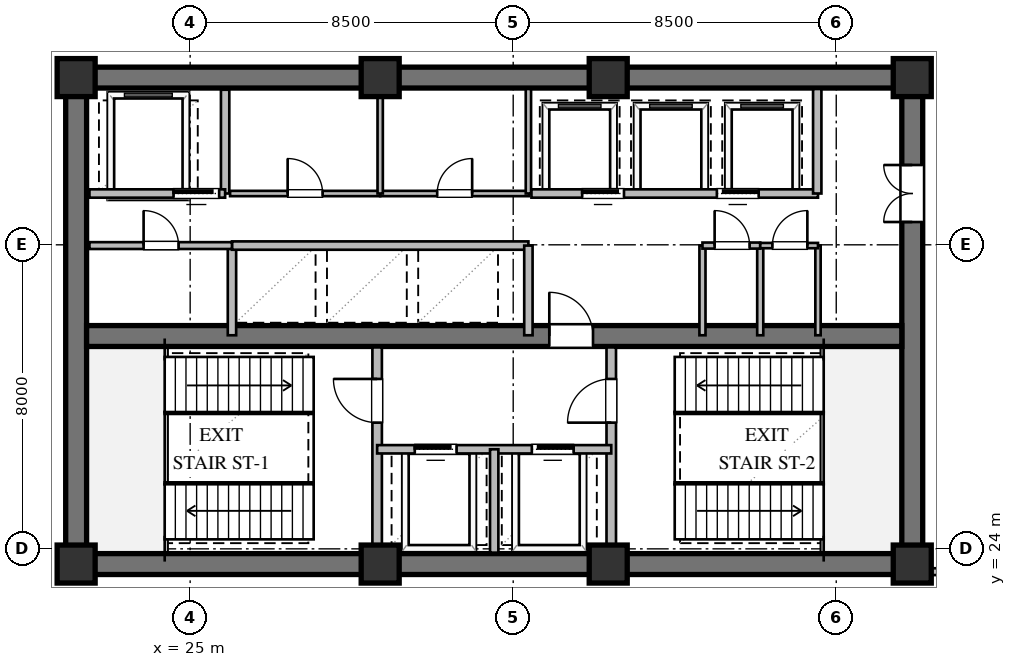
"""IFC4 building model, lengths in metres.
Left out: names, types, materials, properties, quantities, classifications, styles, units other than length and angle.
Written with IfcOpenShell. Run it as: python <this file> out.ifc"""

import sys

from ifc_helpers import new_model, si_unit, direction, frame, frame_2d, origin, origin_2d, place, context, subcontext, project, spatial, rectangle, extrude, element, fill, save


model = new_model("IFC4")
c1 = context("Model", 3, precision=1e-05, world=origin(), true_north=direction((0.0, 1.0)))
c2 = subcontext(c1, "Body", "Model", "MODEL_VIEW")
j1 = project(units=[si_unit("LENGTHUNIT", "METRE"), si_unit("PLANEANGLEUNIT", "RADIAN")], contexts=[c1])
p1 = place(None, origin())
s1 = spatial("IfcSite", under=j1, at=p1, CompositionType="ELEMENT")
p2 = place(p1, origin())
s2 = spatial("IfcBuilding", under=s1, at=p2, CompositionType="ELEMENT")
p3 = place(p2, frame((0.0, 0.0, 181.8)))
s3 = spatial("IfcBuildingStorey", under=s2, at=p3, CompositionType="ELEMENT", Elevation=181.8)
for number, where, z_axis, x_axis in (
    (1, (21.725, 23.6, 0.0), (0.0, 0.0, 1.0), (1.0, 0.0, 0.0)),
    (2, (21.725, 36.4, 0.0), (0.0, 0.0, 1.0), (1.0, 0.0, 0.0)),
):
    element("IfcWall", number, at=place(p3, frame(where, z_axis=z_axis, x_axis=x_axis)), inside=s3, PredefinedType="SHEAR", context=c2, shape_type="SweptSolid", body=[
        extrude(rectangle(XDim=22.55, YDim=0.55, at=frame_2d((11.275, 0.0))), origin(), (0.0, 0.0, 1.0), 5.16),
    ])
p4 = place(p3, frame((22.0, 23.875, 0.0), z_axis=(0.0, 0.0, 1.0), x_axis=(0.0, 1.0, 0.0)))
e3 = element("IfcWall", 3, at=p4, inside=s3, PredefinedType="SHEAR", context=c2, shape_type="SweptSolid", body=[
    extrude(rectangle(XDim=12.25, YDim=0.55, at=frame_2d((6.125, 0.0))), origin(), (0.0, 0.0, 1.0), 5.16),
])
p5 = place(p3, frame((44.0, 23.875, 0.0), z_axis=(0.0, 0.0, 1.0), x_axis=(0.0, 1.0, 0.0)))
e4 = element("IfcWall", 4, at=p5, inside=s3, PredefinedType="SHEAR", context=c2, shape_type="SweptSolid", body=[
    extrude(rectangle(XDim=12.25, YDim=0.55, at=frame_2d((6.125, 0.0))), origin(), (0.0, 0.0, 1.0), 5.16),
])
p6 = place(p5, frame((8.725, 0.0, 0.0)))
e5 = element("IfcOpeningElement", 5, at=p6, cuts=e4, PredefinedType="OPENING", context=c2, shape_type="SweptSolid", body=[
    extrude(rectangle(XDim=1.5, YDim=2.15, at=frame_2d((0.75, 1.075))), frame((0.0, 0.285, 0.0), z_axis=(0.0, -1.0, 0.0), x_axis=(1.0, 0.0, 0.0)), (0.0, 0.0, 1.0), 0.57),
])
p7 = place(p3, frame((22.275, 29.6, 0.0), z_axis=(0.0, 0.0, 1.0), x_axis=(1.0, 0.0, 0.0)))
e6 = element("IfcWall", 6, at=p7, inside=s3, PredefinedType="SHEAR", context=c2, shape_type="SweptSolid", body=[
    extrude(rectangle(XDim=21.45, YDim=0.55, at=frame_2d((10.725, 0.0))), origin(), (0.0, 0.0, 1.0), 5.16),
])
p8 = place(p7, frame((12.175, 0.0, 0.0)))
e7 = element("IfcOpeningElement", 7, at=p8, cuts=e6, PredefinedType="OPENING", context=c2, shape_type="SweptSolid", body=[
    extrude(rectangle(XDim=1.15, YDim=2.1, at=frame_2d((0.575, 1.05))), frame((0.0, 0.285, 0.0), z_axis=(0.0, -1.0, 0.0), x_axis=(1.0, 0.0, 0.0)), (0.0, 0.0, 1.0), 0.57),
])
for number, where, z_axis, x_axis in (
    (8, (22.0, 23.6, 0.0), (0.0, 0.0, 1.0), (1.0, 0.0, 0.0)),
    (9, (30.0, 23.6, 0.0), (0.0, 0.0, 1.0), (1.0, 0.0, 0.0)),
    (10, (36.0, 23.6, 0.0), (0.0, 0.0, 1.0), (1.0, 0.0, 0.0)),
    (11, (44.0, 23.6, 0.0), (0.0, 0.0, 1.0), (1.0, 0.0, 0.0)),
    (12, (44.0, 36.4, 0.0), (0.0, 0.0, 1.0), (1.0, 0.0, 0.0)),
    (13, (36.0, 36.4, 0.0), (0.0, 0.0, 1.0), (1.0, 0.0, 0.0)),
    (14, (30.0, 36.4, 0.0), (0.0, 0.0, 1.0), (1.0, 0.0, 0.0)),
    (15, (22.0, 36.4, 0.0), (0.0, 0.0, 1.0), (1.0, 0.0, 0.0)),
):
    element("IfcColumn", number, at=place(p3, frame(where, z_axis=z_axis, x_axis=x_axis)), inside=s3, PredefinedType="COLUMN", context=c2, shape_type="SweptSolid", body=[
        extrude(rectangle(XDim=1.0, YDim=1.0, at=origin_2d()), origin(), (0.0, 0.0, 1.0), 5.4),
    ])
p9 = place(p3, frame((29.92, 23.9, 0.0), z_axis=(0.0, 0.0, 1.0), x_axis=(0.0, 1.0, 0.0)))
e16 = element("IfcWall", 16, at=p9, inside=s3, PredefinedType="SOLIDWALL", context=c2, shape_type="SweptSolid", body=[
    extrude(rectangle(XDim=5.4, YDim=0.25, at=frame_2d((2.7, 0.0))), origin(), (0.0, 0.0, 1.0), 3.65),
])
p10 = place(p9, frame((3.421, 0.0, 0.0)))
e17 = element("IfcOpeningElement", 17, at=p10, cuts=e16, PredefinedType="OPENING", context=c2, shape_type="SweptSolid", body=[
    extrude(rectangle(XDim=1.15, YDim=2.1, at=frame_2d((0.575, 1.05))), frame((0.0, 0.135, 0.0), z_axis=(0.0, -1.0, 0.0), x_axis=(1.0, 0.0, 0.0)), (0.0, 0.0, 1.0), 0.27),
])
p11 = place(p3, frame((36.08, 23.9, 0.0), z_axis=(0.0, 0.0, 1.0), x_axis=(0.0, 1.0, 0.0)))
e18 = element("IfcWall", 18, at=p11, inside=s3, PredefinedType="SOLIDWALL", context=c2, shape_type="SweptSolid", body=[
    extrude(rectangle(XDim=5.4, YDim=0.25, at=frame_2d((2.7, 0.0))), origin(), (0.0, 0.0, 1.0), 5.16),
])
p12 = place(p11, frame((3.421, 0.0, 0.0)))
e19 = element("IfcOpeningElement", 19, at=p12, cuts=e18, PredefinedType="OPENING", context=c2, shape_type="SweptSolid", body=[
    extrude(rectangle(XDim=1.15, YDim=2.1, at=frame_2d((0.575, 1.05))), frame((0.0, 0.135, 0.0), z_axis=(0.0, -1.0, 0.0), x_axis=(1.0, 0.0, 0.0)), (0.0, 0.0, 1.0), 0.27),
])
p13 = place(p3, frame((29.92, 26.62, 0.0), z_axis=(0.0, 0.0, 1.0), x_axis=(1.0, 0.0, 0.0)))
e20 = element("IfcWall", 20, at=p13, inside=s3, PredefinedType="SOLIDWALL", context=c2, shape_type="SweptSolid", body=[
    extrude(rectangle(XDim=6.16, YDim=0.22, at=frame_2d((3.08, 0.0))), origin(), (0.0, 0.0, 1.0), 5.16),
])
p14 = place(p13, frame((0.99, 0.0, 0.0)))
e21 = element("IfcOpeningElement", 21, at=p14, cuts=e20, PredefinedType="OPENING", context=c2, shape_type="SweptSolid", body=[
    extrude(rectangle(XDim=1.1, YDim=2.1, at=frame_2d((0.55, 1.05))), frame((0.0, 0.12, 0.0), z_axis=(0.0, -1.0, 0.0), x_axis=(1.0, 0.0, 0.0)), (0.0, 0.0, 1.0), 0.24),
])
p15 = place(p13, frame((4.07, 0.0, 0.0)))
e22 = element("IfcOpeningElement", 22, at=p15, cuts=e20, PredefinedType="OPENING", context=c2, shape_type="SweptSolid", body=[
    extrude(rectangle(XDim=1.1, YDim=2.1, at=frame_2d((0.55, 1.05))), frame((0.0, 0.12, 0.0), z_axis=(0.0, -1.0, 0.0), x_axis=(1.0, 0.0, 0.0)), (0.0, 0.0, 1.0), 0.24),
])
p16 = place(p3, frame((33.0, 23.9, 0.0), z_axis=(0.0, 0.0, 1.0), x_axis=(0.0, 1.0, 0.0)))
e23 = element("IfcWall", 23, at=p16, inside=s3, PredefinedType="SOLIDWALL", context=c2, shape_type="SweptSolid", body=[
    extrude(rectangle(XDim=2.72, YDim=0.22, at=frame_2d((1.36, 0.0))), origin(), (0.0, 0.0, 1.0), 5.16),
])
p17 = place(p3, frame((25.92, 33.35, 0.0), z_axis=(0.0, 0.0, 1.0), x_axis=(0.0, 1.0, 0.0)))
e24 = element("IfcWall", 24, at=p17, inside=s3, PredefinedType="SOLIDWALL", context=c2, shape_type="SweptSolid", body=[
    extrude(rectangle(XDim=2.73, YDim=0.22, at=frame_2d((1.365, 0.0))), origin(), (0.0, 0.0, 1.0), 5.16),
])
p18 = place(p3, frame((22.35, 33.35, 0.0), z_axis=(0.0, 0.0, 1.0), x_axis=(1.0, 0.0, 0.0)))
e25 = element("IfcWall", 25, at=p18, inside=s3, PredefinedType="SOLIDWALL", context=c2, shape_type="SweptSolid", body=[
    extrude(rectangle(XDim=3.57, YDim=0.22, at=frame_2d((1.785, 0.0))), origin(), (0.0, 0.0, 1.0), 5.16),
])
p19 = place(p18, frame((2.213, 0.0, 0.0)))
e26 = element("IfcOpeningElement", 26, at=p19, cuts=e25, PredefinedType="OPENING", context=c2, shape_type="SweptSolid", body=[
    extrude(rectangle(XDim=1.2, YDim=2.1, at=frame_2d((0.6, 1.05))), frame((0.0, 0.12, 0.0), z_axis=(0.0, -1.0, 0.0), x_axis=(1.0, 0.0, 0.0)), (0.0, 0.0, 1.0), 0.24),
])
p20 = place(p3, frame((26.1, 29.62, 0.0), z_axis=(0.0, 0.0, 1.0), x_axis=(0.0, 1.0, 0.0)))
e27 = element("IfcWall", 27, at=p20, inside=s3, PredefinedType="SOLIDWALL", context=c2, shape_type="SweptSolid", body=[
    extrude(rectangle(XDim=2.36, YDim=0.22, at=frame_2d((1.18, 0.0))), origin(), (0.0, 0.0, 1.0), 5.16),
])
p21 = place(p3, frame((26.1, 31.98, 0.0), z_axis=(0.0, 0.0, 1.0), x_axis=(1.0, 0.0, 0.0)))
e28 = element("IfcWall", 28, at=p21, inside=s3, PredefinedType="SOLIDWALL", context=c2, shape_type="SweptSolid", body=[
    extrude(rectangle(XDim=7.8, YDim=0.22, at=frame_2d((3.9, 0.0))), origin(), (0.0, 0.0, 1.0), 5.16),
])
p22 = place(p3, frame((33.9, 29.62, 0.0), z_axis=(0.0, 0.0, 1.0), x_axis=(0.0, 1.0, 0.0)))
e29 = element("IfcWall", 29, at=p22, inside=s3, PredefinedType="SOLIDWALL", context=c2, shape_type="SweptSolid", body=[
    extrude(rectangle(XDim=2.36, YDim=0.22, at=frame_2d((1.18, 0.0))), origin(), (0.0, 0.0, 1.0), 5.16),
])
p23 = place(p3, frame((26.05, 33.35, 0.0), z_axis=(0.0, 0.0, 1.0), x_axis=(1.0, 0.0, 0.0)))
e30 = element("IfcWall", 30, at=p23, inside=s3, PredefinedType="PARTITIONING", context=c2, shape_type="SweptSolid", body=[
    extrude(rectangle(XDim=3.95, YDim=0.14, at=frame_2d((1.975, 0.0))), origin(), (0.0, 0.0, 1.0), 5.16),
])
p24 = place(p23, frame((1.515, 0.0, 0.0)))
e31 = element("IfcOpeningElement", 31, at=p24, cuts=e30, PredefinedType="OPENING", context=c2, shape_type="SweptSolid", body=[
    extrude(rectangle(XDim=0.92, YDim=2.1, at=frame_2d((0.46, 1.05))), frame((0.0, 0.08, 0.0), z_axis=(0.0, -1.0, 0.0), x_axis=(1.0, 0.0, 0.0)), (0.0, 0.0, 1.0), 0.16),
])
p25 = place(p3, frame((30.0, 33.35, 0.0), z_axis=(0.0, 0.0, 1.0), x_axis=(1.0, 0.0, 0.0)))
e32 = element("IfcWall", 32, at=p25, inside=s3, PredefinedType="PARTITIONING", context=c2, shape_type="SweptSolid", body=[
    extrude(rectangle(XDim=3.92, YDim=0.14, at=frame_2d((1.96, 0.0))), origin(), (0.0, 0.0, 1.0), 5.16),
])
p26 = place(p25, frame((1.5, 0.0, 0.0)))
e33 = element("IfcOpeningElement", 33, at=p26, cuts=e32, PredefinedType="OPENING", context=c2, shape_type="SweptSolid", body=[
    extrude(rectangle(XDim=0.92, YDim=2.1, at=frame_2d((0.46, 1.05))), frame((0.0, 0.08, 0.0), z_axis=(0.0, -1.0, 0.0), x_axis=(1.0, 0.0, 0.0)), (0.0, 0.0, 1.0), 0.16),
])
for number, where, z_axis, x_axis in (
    (34, (30.0, 33.35, 0.0), (0.0, 0.0, 1.0), (0.0, 1.0, 0.0)),
    (35, (33.9, 33.35, 0.0), (0.0, 0.0, 1.0), (0.0, 1.0, 0.0)),
):
    element("IfcWall", number, at=place(p3, frame(where, z_axis=z_axis, x_axis=x_axis)), inside=s3, PredefinedType="PARTITIONING", context=c2, shape_type="SweptSolid", body=[
        extrude(rectangle(XDim=2.75, YDim=0.14, at=frame_2d((1.375, 0.0))), origin(), (0.0, 0.0, 1.0), 5.16),
    ])
p27 = place(p3, frame((33.98, 33.35, 0.0), z_axis=(0.0, 0.0, 1.0), x_axis=(1.0, 0.0, 0.0)))
e36 = element("IfcWall", 36, at=p27, inside=s3, PredefinedType="SOLIDWALL", context=c2, shape_type="SweptSolid", body=[
    extrude(rectangle(XDim=7.54, YDim=0.22, at=frame_2d((3.77, 0.0))), origin(), (0.0, 0.0, 1.0), 5.16),
])
p28 = place(p27, frame((1.335, 0.0, 0.0)))
e37 = element("IfcOpeningElement", 37, at=p28, cuts=e36, PredefinedType="OPENING", context=c2, shape_type="SweptSolid", body=[
    extrude(rectangle(XDim=1.1, YDim=2.1, at=frame_2d((0.55, 1.05))), frame((0.0, 0.12, 0.0), z_axis=(0.0, -1.0, 0.0), x_axis=(1.0, 0.0, 0.0)), (0.0, 0.0, 1.0), 0.24),
])
p29 = place(p27, frame((4.879, 0.0, 0.0)))
e38 = element("IfcOpeningElement", 38, at=p29, cuts=e36, PredefinedType="OPENING", context=c2, shape_type="SweptSolid", body=[
    extrude(rectangle(XDim=1.1, YDim=2.1, at=frame_2d((0.55, 1.05))), frame((0.0, 0.12, 0.0), z_axis=(0.0, -1.0, 0.0), x_axis=(1.0, 0.0, 0.0)), (0.0, 0.0, 1.0), 0.24),
])
p30 = place(p3, frame((41.5, 33.35, 0.0), z_axis=(0.0, 0.0, 1.0), x_axis=(0.0, 1.0, 0.0)))
e39 = element("IfcWall", 39, at=p30, inside=s3, PredefinedType="SOLIDWALL", context=c2, shape_type="SweptSolid", body=[
    extrude(rectangle(XDim=2.75, YDim=0.22, at=frame_2d((1.375, 0.0))), origin(), (0.0, 0.0, 1.0), 5.16),
])
p31 = place(p3, frame((22.35, 31.98, 0.0), z_axis=(0.0, 0.0, 1.0), x_axis=(1.0, 0.0, 0.0)))
e40 = element("IfcWall", 40, at=p31, inside=s3, PredefinedType="PARTITIONING", context=c2, shape_type="SweptSolid", body=[
    extrude(rectangle(XDim=3.75, YDim=0.18, at=frame_2d((1.875, 0.0))), origin(), (0.0, 0.0, 1.0), 5.16),
])
p32 = place(p31, frame((1.425, 0.0, 0.0)))
e41 = element("IfcOpeningElement", 41, at=p32, cuts=e40, PredefinedType="OPENING", context=c2, shape_type="SweptSolid", body=[
    extrude(rectangle(XDim=0.92, YDim=2.1, at=frame_2d((0.46, 1.05))), frame((0.0, 0.1, 0.0), z_axis=(0.0, -1.0, 0.0), x_axis=(1.0, 0.0, 0.0)), (0.0, 0.0, 1.0), 0.2),
])
for number, where, z_axis, x_axis in (
    (42, (38.48, 29.62, 0.0), (0.0, 0.0, 1.0), (0.0, 1.0, 0.0)),
    (43, (40.0, 29.62, 0.0), (0.0, 0.0, 1.0), (0.0, 1.0, 0.0)),
):
    element("IfcWall", number, at=place(p3, frame(where, z_axis=z_axis, x_axis=x_axis)), inside=s3, PredefinedType="PLUMBINGWALL", context=c2, shape_type="SweptSolid", body=[
        extrude(rectangle(XDim=2.36, YDim=0.16, at=frame_2d((1.18, 0.0))), origin(), (0.0, 0.0, 1.0), 5.16),
    ])
p33 = place(p3, frame((41.52, 29.62, 0.0), z_axis=(0.0, 0.0, 1.0), x_axis=(0.0, 1.0, 0.0)))
e44 = element("IfcWall", 44, at=p33, inside=s3, PredefinedType="PARTITIONING", context=c2, shape_type="SweptSolid", body=[
    extrude(rectangle(XDim=2.36, YDim=0.14, at=frame_2d((1.18, 0.0))), origin(), (0.0, 0.0, 1.0), 2.187),
])
p34 = place(p3, frame((38.48, 31.98, 0.0), z_axis=(0.0, 0.0, 1.0), x_axis=(1.0, 0.0, 0.0)))
e45 = element("IfcWall", 45, at=p34, inside=s3, PredefinedType="PLUMBINGWALL", context=c2, shape_type="SweptSolid", body=[
    extrude(rectangle(XDim=1.52, YDim=0.16, at=frame_2d((0.76, 0.0))), origin(), (0.0, 0.0, 1.0), 5.16),
])
p35 = place(p34, frame((0.32, 0.0, 0.0)))
e46 = element("IfcOpeningElement", 46, at=p35, cuts=e45, PredefinedType="OPENING", context=c2, shape_type="SweptSolid", body=[
    extrude(rectangle(XDim=0.92, YDim=2.1, at=frame_2d((0.46, 1.05))), frame((0.0, 0.09, 0.0), z_axis=(0.0, -1.0, 0.0), x_axis=(1.0, 0.0, 0.0)), (0.0, 0.0, 1.0), 0.18),
])
p36 = place(p3, frame((40.0, 31.98, 0.0), z_axis=(0.0, 0.0, 1.0), x_axis=(1.0, 0.0, 0.0)))
e47 = element("IfcWall", 47, at=p36, inside=s3, PredefinedType="PARTITIONING", context=c2, shape_type="SweptSolid", body=[
    extrude(rectangle(XDim=1.52, YDim=0.14, at=frame_2d((0.76, 0.0))), origin(), (0.0, 0.0, 1.0), 5.16),
])
p37 = place(p36, frame((0.32, 0.0, 0.0)))
e48 = element("IfcOpeningElement", 48, at=p37, cuts=e47, PredefinedType="OPENING", context=c2, shape_type="SweptSolid", body=[
    extrude(rectangle(XDim=0.92, YDim=2.1, at=frame_2d((0.46, 1.05))), frame((0.0, 0.08, 0.0), z_axis=(0.0, -1.0, 0.0), x_axis=(1.0, 0.0, 0.0)), (0.0, 0.0, 1.0), 0.16),
])
p38 = place(p3, frame((44.275, 23.4, 0.0), z_axis=(0.0, 0.0, 1.0), x_axis=(1.0, 0.0, 0.0)))
e49 = element("IfcWall", 49, at=p38, inside=s3, PredefinedType="PARTITIONING", context=c2, shape_type="SweptSolid", body=[
    extrude(rectangle(XDim=8.225, YDim=0.18, at=frame_2d((4.113, 0.0))), origin(), (0.0, 0.0, 1.0), 3.65),
])
p39 = place(p10, origin())
e50 = element("IfcDoor", 50, at=p39, inside=s3, OperationType="SINGLE_SWING_RIGHT", PredefinedType="DOOR", context=c2, shape_type="SweptSolid", body=[
    extrude(rectangle(XDim=1.15, YDim=2.1, at=frame_2d((0.575, 1.05))), frame((0.0, 0.025, 0.0), z_axis=(0.0, -1.0, 0.0), x_axis=(1.0, 0.0, 0.0)), (0.0, 0.0, 1.0), 0.05),
])
fill(e17, e50)
p40 = place(p12, origin())
e51 = element("IfcDoor", 51, at=p40, inside=s3, OperationType="SINGLE_SWING_LEFT", PredefinedType="DOOR", context=c2, shape_type="SweptSolid", body=[
    extrude(rectangle(XDim=1.15, YDim=2.1, at=frame_2d((0.575, 1.05))), frame((0.0, 0.025, 0.0), z_axis=(0.0, -1.0, 0.0), x_axis=(1.0, 0.0, 0.0)), (0.0, 0.0, 1.0), 0.05),
])
fill(e19, e51)
p41 = place(p14, origin())
e52 = element("IfcDoor", 52, at=p41, inside=s3, OperationType="SLIDING_TO_LEFT", PredefinedType="DOOR", context=c2, shape_type="SweptSolid", body=[
    extrude(rectangle(XDim=1.1, YDim=2.1, at=frame_2d((0.55, 1.05))), frame((0.0, 0.025, 0.0), z_axis=(0.0, -1.0, 0.0), x_axis=(1.0, 0.0, 0.0)), (0.0, 0.0, 1.0), 0.05),
])
fill(e21, e52)
p42 = place(p15, origin())
e53 = element("IfcDoor", 53, at=p42, inside=s3, OperationType="SLIDING_TO_RIGHT", PredefinedType="DOOR", context=c2, shape_type="SweptSolid", body=[
    extrude(rectangle(XDim=1.1, YDim=2.1, at=frame_2d((0.55, 1.05))), frame((0.0, 0.025, 0.0), z_axis=(0.0, -1.0, 0.0), x_axis=(1.0, 0.0, 0.0)), (0.0, 0.0, 1.0), 0.05),
])
fill(e22, e53)
p43 = place(p8, origin())
e54 = element("IfcDoor", 54, at=p43, inside=s3, OperationType="SINGLE_SWING_LEFT", PredefinedType="DOOR", context=c2, shape_type="SweptSolid", body=[
    extrude(rectangle(XDim=1.15, YDim=2.1, at=frame_2d((0.575, 1.05))), frame((0.0, 0.025, 0.0), z_axis=(0.0, -1.0, 0.0), x_axis=(1.0, 0.0, 0.0)), (0.0, 0.0, 1.0), 0.05),
])
fill(e7, e54)
p44 = place(p6, origin())
e55 = element("IfcDoor", 55, at=p44, inside=s3, OperationType="DOUBLE_DOOR_SINGLE_SWING", PredefinedType="DOOR", context=c2, shape_type="SweptSolid", body=[
    extrude(rectangle(XDim=1.5, YDim=2.15, at=frame_2d((0.75, 1.075))), frame((0.0, 0.025, 0.0), z_axis=(0.0, -1.0, 0.0), x_axis=(1.0, 0.0, 0.0)), (0.0, 0.0, 1.0), 0.05),
])
fill(e5, e55)
p45 = place(p19, origin())
e56 = element("IfcDoor", 56, at=p45, inside=s3, OperationType="SLIDING_TO_LEFT", PredefinedType="DOOR", context=c2, shape_type="SweptSolid", body=[
    extrude(rectangle(XDim=1.2, YDim=2.1, at=frame_2d((0.6, 1.05))), frame((0.0, 0.025, 0.0), z_axis=(0.0, -1.0, 0.0), x_axis=(1.0, 0.0, 0.0)), (0.0, 0.0, 1.0), 0.05),
])
fill(e26, e56)
p46 = place(p24, origin())
e57 = element("IfcDoor", 57, at=p46, inside=s3, OperationType="SINGLE_SWING_LEFT", PredefinedType="DOOR", context=c2, shape_type="SweptSolid", body=[
    extrude(rectangle(XDim=0.92, YDim=2.1, at=frame_2d((0.46, 1.05))), frame((0.0, 0.025, 0.0), z_axis=(0.0, -1.0, 0.0), x_axis=(1.0, 0.0, 0.0)), (0.0, 0.0, 1.0), 0.05),
])
fill(e31, e57)
p47 = place(p26, origin())
e58 = element("IfcDoor", 58, at=p47, inside=s3, OperationType="SINGLE_SWING_RIGHT", PredefinedType="DOOR", context=c2, shape_type="SweptSolid", body=[
    extrude(rectangle(XDim=0.92, YDim=2.1, at=frame_2d((0.46, 1.05))), frame((0.0, 0.025, 0.0), z_axis=(0.0, -1.0, 0.0), x_axis=(1.0, 0.0, 0.0)), (0.0, 0.0, 1.0), 0.05),
])
fill(e33, e58)
p48 = place(p28, origin())
e59 = element("IfcDoor", 59, at=p48, inside=s3, OperationType="SLIDING_TO_LEFT", PredefinedType="DOOR", context=c2, shape_type="SweptSolid", body=[
    extrude(rectangle(XDim=1.1, YDim=2.1, at=frame_2d((0.55, 1.05))), frame((0.0, 0.025, 0.0), z_axis=(0.0, -1.0, 0.0), x_axis=(1.0, 0.0, 0.0)), (0.0, 0.0, 1.0), 0.05),
])
fill(e37, e59)
p49 = place(p29, origin())
e60 = element("IfcDoor", 60, at=p49, inside=s3, OperationType="SLIDING_TO_RIGHT", PredefinedType="DOOR", context=c2, shape_type="SweptSolid", body=[
    extrude(rectangle(XDim=1.1, YDim=2.1, at=frame_2d((0.55, 1.05))), frame((0.0, 0.025, 0.0), z_axis=(0.0, -1.0, 0.0), x_axis=(1.0, 0.0, 0.0)), (0.0, 0.0, 1.0), 0.05),
])
fill(e38, e60)
p50 = place(p32, origin())
e61 = element("IfcDoor", 61, at=p50, inside=s3, OperationType="SINGLE_SWING_LEFT", PredefinedType="DOOR", context=c2, shape_type="SweptSolid", body=[
    extrude(rectangle(XDim=0.92, YDim=2.1, at=frame_2d((0.46, 1.05))), frame((0.0, 0.025, 0.0), z_axis=(0.0, -1.0, 0.0), x_axis=(1.0, 0.0, 0.0)), (0.0, 0.0, 1.0), 0.05),
])
fill(e41, e61)
p51 = place(p35, origin())
e62 = element("IfcDoor", 62, at=p51, inside=s3, OperationType="SINGLE_SWING_LEFT", PredefinedType="DOOR", context=c2, shape_type="SweptSolid", body=[
    extrude(rectangle(XDim=0.92, YDim=2.1, at=frame_2d((0.46, 1.05))), frame((0.0, 0.025, 0.0), z_axis=(0.0, -1.0, 0.0), x_axis=(1.0, 0.0, 0.0)), (0.0, 0.0, 1.0), 0.05),
])
fill(e46, e62)
p52 = place(p37, origin())
e63 = element("IfcDoor", 63, at=p52, inside=s3, OperationType="SINGLE_SWING_RIGHT", PredefinedType="DOOR", context=c2, shape_type="SweptSolid", body=[
    extrude(rectangle(XDim=0.92, YDim=2.1, at=frame_2d((0.46, 1.05))), frame((0.0, 0.025, 0.0), z_axis=(0.0, -1.0, 0.0), x_axis=(1.0, 0.0, 0.0)), (0.0, 0.0, 1.0), 0.05),
])
fill(e48, e63)
save(model, sys.argv[1])
